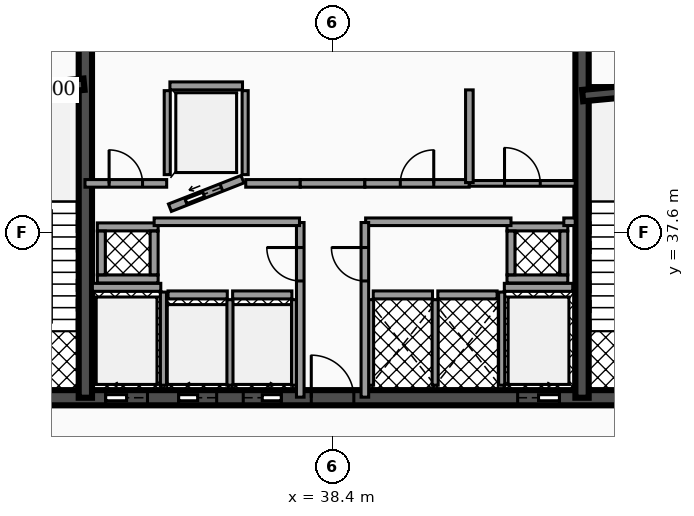
"""IFC4 building model, lengths in metres.
Left out: names, types, materials, properties, quantities, classifications, styles, units other than length and angle.
Written with IfcOpenShell. Run it as: python <this file> out.ifc"""

import sys

from ifc_helpers import new_model, si_unit, direction, frame, frame_2d, origin, place, context, subcontext, project, spatial, rectangle, extrude, element, fill, save


model = new_model("IFC4")
c1 = context("Model", 3, precision=1e-05, world=origin(), true_north=direction((0.0, 1.0)))
c2 = subcontext(c1, "Body", "Model", "MODEL_VIEW")
j1 = project(units=[si_unit("LENGTHUNIT", "METRE"), si_unit("PLANEANGLEUNIT", "RADIAN")], contexts=[c1])
p1 = place(None, origin())
s1 = spatial("IfcSite", under=j1, at=p1, CompositionType="ELEMENT")
p2 = place(p1, origin())
s2 = spatial("IfcBuilding", under=s1, at=p2, CompositionType="ELEMENT")
p3 = place(p2, frame((0.0, 0.0, 114.58)))
s3 = spatial("IfcBuildingStorey", under=s2, at=p3, CompositionType="ELEMENT", Elevation=114.58)
p4 = place(p3, frame((28.4, 33.25, 0.0), z_axis=(0.0, 0.0, 1.0), x_axis=(1.0, 0.0, 0.0)))
e1 = element("IfcWall", 1, at=p4, inside=s3, PredefinedType="SHEAR", context=c2, shape_type="SweptSolid", body=[
    extrude(rectangle(XDim=20.06, YDim=0.4, at=frame_2d((10.03, 0.0))), origin(), (0.0, 0.0, 1.0), 4.12),
])
p5 = place(p4, frame((4.03, 0.0, 0.0)))
e2 = element("IfcOpeningElement", 2, at=p5, cuts=e1, PredefinedType="OPENING", context=c2, shape_type="SweptSolid", body=[
    extrude(rectangle(XDim=1.1, YDim=2.15, at=frame_2d((0.55, 1.075))), frame((0.0, 0.21, 0.0), z_axis=(0.0, -1.0, 0.0), x_axis=(1.0, 0.0, 0.0)), (0.0, 0.0, 1.0), 0.42),
])
p6 = place(p4, frame((14.87, 0.0, 0.0)))
e3 = element("IfcOpeningElement", 3, at=p6, cuts=e1, PredefinedType="OPENING", context=c2, shape_type="SweptSolid", body=[
    extrude(rectangle(XDim=1.1, YDim=2.15, at=frame_2d((0.55, 1.075))), frame((0.0, 0.21, 0.0), z_axis=(0.0, -1.0, 0.0), x_axis=(1.0, 0.0, 0.0)), (0.0, 0.0, 1.0), 0.42),
])
p7 = place(p4, frame((5.95, 0.0, 0.0)))
e4 = element("IfcOpeningElement", 4, at=p7, cuts=e1, PredefinedType="OPENING", context=c2, shape_type="SweptSolid", body=[
    extrude(rectangle(XDim=1.0, YDim=2.1, at=frame_2d((0.5, 1.05))), frame((0.0, 0.21, 0.0), z_axis=(0.0, -1.0, 0.0), x_axis=(1.0, 0.0, 0.0)), (0.0, 0.0, 1.0), 0.42),
])
p8 = place(p4, frame((7.65, 0.0, 0.0)))
e5 = element("IfcOpeningElement", 5, at=p8, cuts=e1, PredefinedType="OPENING", context=c2, shape_type="SweptSolid", body=[
    extrude(rectangle(XDim=1.0, YDim=2.1, at=frame_2d((0.5, 1.05))), frame((0.0, 0.21, 0.0), z_axis=(0.0, -1.0, 0.0), x_axis=(1.0, 0.0, 0.0)), (0.0, 0.0, 1.0), 0.42),
])
p9 = place(p4, frame((1.31, 0.0, 0.0)))
e6 = element("IfcOpeningElement", 6, at=p9, cuts=e1, PredefinedType="OPENING", context=c2, shape_type="SweptSolid", body=[
    extrude(rectangle(XDim=1.1, YDim=2.2, at=frame_2d((0.55, 1.1))), frame((0.0, 0.21, 0.0), z_axis=(0.0, -1.0, 0.0), x_axis=(1.0, 0.0, 0.0)), (0.0, 0.0, 1.0), 0.42),
])
p10 = place(p4, frame((9.44, 0.0, 0.0)))
e7 = element("IfcOpeningElement", 7, at=p10, cuts=e1, PredefinedType="OPENING", context=c2, shape_type="SweptSolid", body=[
    extrude(rectangle(XDim=1.12, YDim=2.05, at=frame_2d((0.56, 1.025))), frame((0.0, 0.21, 0.0), z_axis=(0.0, -1.0, 0.0), x_axis=(1.0, 0.0, 0.0)), (0.0, 0.0, 1.0), 0.42),
])
p11 = place(p4, frame((17.65, 0.0, 0.0)))
e8 = element("IfcOpeningElement", 8, at=p11, cuts=e1, PredefinedType="OPENING", context=c2, shape_type="SweptSolid", body=[
    extrude(rectangle(XDim=1.1, YDim=2.2, at=frame_2d((0.55, 1.1))), frame((0.0, 0.21, 0.0), z_axis=(0.0, -1.0, 0.0), x_axis=(1.0, 0.0, 0.0)), (0.0, 0.0, 1.0), 0.42),
])
for number, where, z_axis, x_axis in (
    (9, (31.895, 33.25, 0.0), (0.0, 0.0, 1.0), (0.0, 1.0, 0.0)),
    (10, (44.965, 33.25, 0.0), (0.0, 0.0, 1.0), (0.0, 1.0, 0.0)),
):
    element("IfcWall", number, at=place(p3, frame(where, z_axis=z_axis, x_axis=x_axis)), inside=s3, PredefinedType="SHEAR", context=c2, shape_type="SweptSolid", body=[
        extrude(rectangle(XDim=10.2, YDim=0.35, at=frame_2d((5.1, 0.0))), origin(), (0.0, 0.0, 1.0), 4.12),
    ])
p12 = place(p3, frame((28.64, 41.2, 0.0), z_axis=(0.0, 0.0, 1.0), x_axis=(0.995687118776, 0.092774789157, 0.0)))
e11 = element("IfcWall", 11, at=p12, inside=s3, PredefinedType="SHEAR", context=c2, shape_type="SweptSolid", body=[
    extrude(rectangle(XDim=3.234, YDim=0.3, at=frame_2d((1.617, 0.0))), origin(), (0.0, 0.0, 1.0), 4.12),
])
p13 = place(p3, frame((44.98, 41.2, 0.0), z_axis=(0.0, 0.0, 1.0), x_axis=(0.995686468965, 0.09278176286, 0.0)))
e12 = element("IfcWall", 12, at=p13, inside=s3, PredefinedType="SHEAR", context=c2, shape_type="SweptSolid", body=[
    extrude(rectangle(XDim=3.234, YDim=0.3, at=frame_2d((1.617, 0.0))), origin(), (0.0, 0.0, 1.0), 4.12),
])
p14 = place(p3, frame((32.08, 36.155, 0.0), z_axis=(0.0, 0.0, 1.0), x_axis=(1.0, 0.0, 0.0)))
e13 = element("IfcWall", 13, at=p14, inside=s3, PredefinedType="SOLIDWALL", context=c2, shape_type="SweptSolid", body=[
    extrude(rectangle(XDim=1.8, YDim=0.21, at=frame_2d((0.9, 0.0))), origin(), (0.0, 0.0, 1.0), 3.092),
])
p15 = place(p3, frame((33.95, 33.58, 0.0), z_axis=(0.0, 0.0, 1.0), x_axis=(0.0, 1.0, 0.0)))
e14 = element("IfcWall", 14, at=p15, inside=s3, PredefinedType="SOLIDWALL", context=c2, shape_type="SweptSolid", body=[
    extrude(rectangle(XDim=2.45, YDim=0.16, at=frame_2d((1.225, 0.0))), origin(), (0.0, 0.0, 1.0), 3.092),
])
p16 = place(p3, frame((42.92, 36.155, 0.0), z_axis=(0.0, 0.0, 1.0), x_axis=(1.0, 0.0, 0.0)))
e15 = element("IfcWall", 15, at=p16, inside=s3, PredefinedType="SOLIDWALL", context=c2, shape_type="SweptSolid", body=[
    extrude(rectangle(XDim=1.8, YDim=0.21, at=frame_2d((0.9, 0.0))), origin(), (0.0, 0.0, 1.0), 3.092),
])
p17 = place(p3, frame((42.85, 33.58, 0.0), z_axis=(0.0, 0.0, 1.0), x_axis=(0.0, 1.0, 0.0)))
e16 = element("IfcWall", 16, at=p17, inside=s3, PredefinedType="SOLIDWALL", context=c2, shape_type="SweptSolid", body=[
    extrude(rectangle(XDim=2.45, YDim=0.16, at=frame_2d((1.225, 0.0))), origin(), (0.0, 0.0, 1.0), 3.092),
])
p18 = place(p3, frame((34.07, 35.955, 0.0), z_axis=(0.0, 0.0, 1.0), x_axis=(1.0, 0.0, 0.0)))
e17 = element("IfcWall", 17, at=p18, inside=s3, PredefinedType="SOLIDWALL", context=c2, shape_type="SweptSolid", body=[
    extrude(rectangle(XDim=1.56, YDim=0.21, at=frame_2d((0.78, 0.0))), origin(), (0.0, 0.0, 1.0), 3.092),
])
p19 = place(p3, frame((35.7, 33.58, 0.0), z_axis=(0.0, 0.0, 1.0), x_axis=(0.0, 1.0, 0.0)))
e18 = element("IfcWall", 18, at=p19, inside=s3, PredefinedType="SOLIDWALL", context=c2, shape_type="SweptSolid", body=[
    extrude(rectangle(XDim=2.25, YDim=0.16, at=frame_2d((1.125, 0.0))), origin(), (0.0, 0.0, 1.0), 3.092),
])
p20 = place(p3, frame((35.77, 35.955, 0.0), z_axis=(0.0, 0.0, 1.0), x_axis=(1.0, 0.0, 0.0)))
e19 = element("IfcWall", 19, at=p20, inside=s3, PredefinedType="SOLIDWALL", context=c2, shape_type="SweptSolid", body=[
    extrude(rectangle(XDim=1.56, YDim=0.21, at=frame_2d((0.78, 0.0))), origin(), (0.0, 0.0, 1.0), 3.092),
])
p21 = place(p3, frame((37.4, 33.58, 0.0), z_axis=(0.0, 0.0, 1.0), x_axis=(0.0, 1.0, 0.0)))
e20 = element("IfcWall", 20, at=p21, inside=s3, PredefinedType="SOLIDWALL", context=c2, shape_type="SweptSolid", body=[
    extrude(rectangle(XDim=2.25, YDim=0.16, at=frame_2d((1.125, 0.0))), origin(), (0.0, 0.0, 1.0), 3.092),
])
p22 = place(p3, frame((34.12, 38.25, 0.0), z_axis=(0.0, 0.0, 1.0), x_axis=(0.930804993012, 0.36551616241, 0.0)))
e21 = element("IfcWall", 21, at=p22, inside=s3, PredefinedType="SOLIDWALL", context=c2, shape_type="SweptSolid", body=[
    extrude(rectangle(XDim=2.052, YDim=0.21, at=frame_2d((1.026, 0.0))), origin(), (0.0, 0.0, 1.0), 3.092),
])
p23 = place(p22, frame((0.455, 0.0, 0.0)))
e22 = element("IfcOpeningElement", 22, at=p23, cuts=e21, PredefinedType="OPENING", context=c2, shape_type="SweptSolid", body=[
    extrude(rectangle(XDim=1.0, YDim=2.1, at=frame_2d((0.5, 1.05))), frame((0.0, 0.115, 0.0), z_axis=(0.0, -1.0, 0.0), x_axis=(1.0, 0.0, 0.0)), (0.0, 0.0, 1.0), 0.23),
])
p24 = place(p3, frame((34.12, 41.455, 0.0), z_axis=(0.0, 0.0, 1.0), x_axis=(1.0, 0.0, 0.0)))
e23 = element("IfcWall", 23, at=p24, inside=s3, PredefinedType="SOLIDWALL", context=c2, shape_type="SweptSolid", body=[
    extrude(rectangle(XDim=1.91, YDim=0.21, at=frame_2d((0.955, 0.0))), origin(), (0.0, 0.0, 1.0), 3.092),
])
for number, where, z_axis, x_axis in (
    (24, (34.05, 39.12, 0.0), (0.0, 0.0, 1.0), (0.0, 1.0, 0.0)),
    (25, (36.1, 39.12, 0.0), (0.0, 0.0, 1.0), (0.0, 1.0, 0.0)),
):
    element("IfcWall", number, at=place(p3, frame(where, z_axis=z_axis, x_axis=x_axis)), inside=s3, PredefinedType="SOLIDWALL", context=c2, shape_type="SweptSolid", body=[
        extrude(rectangle(XDim=2.21, YDim=0.16, at=frame_2d((1.105, 0.0))), origin(), (0.0, 0.0, 1.0), 3.092),
    ])
p25 = place(p3, frame((39.47, 35.955, 0.0), z_axis=(0.0, 0.0, 1.0), x_axis=(1.0, 0.0, 0.0)))
e26 = element("IfcWall", 26, at=p25, inside=s3, PredefinedType="SOLIDWALL", context=c2, shape_type="SweptSolid", body=[
    extrude(rectangle(XDim=1.56, YDim=0.21, at=frame_2d((0.78, 0.0))), origin(), (0.0, 0.0, 1.0), 3.092),
])
for number, where, z_axis, x_axis in (
    (27, (39.4, 33.58, 0.0), (0.0, 0.0, 1.0), (0.0, 1.0, 0.0)),
    (28, (41.1, 33.58, 0.0), (0.0, 0.0, 1.0), (0.0, 1.0, 0.0)),
):
    element("IfcWall", number, at=place(p3, frame(where, z_axis=z_axis, x_axis=x_axis)), inside=s3, PredefinedType="SOLIDWALL", context=c2, shape_type="SweptSolid", body=[
        extrude(rectangle(XDim=2.25, YDim=0.16, at=frame_2d((1.125, 0.0))), origin(), (0.0, 0.0, 1.0), 3.092),
    ])
p26 = place(p3, frame((41.17, 35.955, 0.0), z_axis=(0.0, 0.0, 1.0), x_axis=(1.0, 0.0, 0.0)))
e29 = element("IfcWall", 29, at=p26, inside=s3, PredefinedType="SOLIDWALL", context=c2, shape_type="SweptSolid", body=[
    extrude(rectangle(XDim=1.56, YDim=0.21, at=frame_2d((0.78, 0.0))), origin(), (0.0, 0.0, 1.0), 3.092),
])
for number, where, z_axis, x_axis in (
    (30, (32.21, 36.375, 0.0), (0.0, 0.0, 1.0), (1.0, 0.0, 0.0)),
    (31, (32.21, 37.745, 0.0), (0.0, 0.0, 1.0), (1.0, 0.0, 0.0)),
):
    element("IfcWall", number, at=place(p3, frame(where, z_axis=z_axis, x_axis=x_axis)), inside=s3, PredefinedType="SOLIDWALL", context=c2, shape_type="SweptSolid", body=[
        extrude(rectangle(XDim=1.6, YDim=0.21, at=frame_2d((0.8, 0.0))), origin(), (0.0, 0.0, 1.0), 4.12),
    ])
for number, where, z_axis, x_axis in (
    (32, (32.315, 36.485, 0.0), (0.0, 0.0, 1.0), (0.0, 1.0, 0.0)),
    (33, (33.705, 36.485, 0.0), (0.0, 0.0, 1.0), (0.0, 1.0, 0.0)),
):
    element("IfcWall", number, at=place(p3, frame(where, z_axis=z_axis, x_axis=x_axis)), inside=s3, PredefinedType="SOLIDWALL", context=c2, shape_type="SweptSolid", body=[
        extrude(rectangle(XDim=1.15, YDim=0.21, at=frame_2d((0.575, 0.0))), origin(), (0.0, 0.0, 1.0), 4.12),
    ])
for number, where, z_axis, x_axis in (
    (34, (42.99, 36.375, 0.0), (0.0, 0.0, 1.0), (1.0, 0.0, 0.0)),
    (35, (42.99, 37.745, 0.0), (0.0, 0.0, 1.0), (1.0, 0.0, 0.0)),
):
    element("IfcWall", number, at=place(p3, frame(where, z_axis=z_axis, x_axis=x_axis)), inside=s3, PredefinedType="SOLIDWALL", context=c2, shape_type="SweptSolid", body=[
        extrude(rectangle(XDim=1.6, YDim=0.21, at=frame_2d((0.8, 0.0))), origin(), (0.0, 0.0, 1.0), 4.12),
    ])
for number, where, z_axis, x_axis in (
    (36, (43.095, 36.485, 0.0), (0.0, 0.0, 1.0), (0.0, 1.0, 0.0)),
    (37, (44.485, 36.485, 0.0), (0.0, 0.0, 1.0), (0.0, 1.0, 0.0)),
):
    element("IfcWall", number, at=place(p3, frame(where, z_axis=z_axis, x_axis=x_axis)), inside=s3, PredefinedType="SOLIDWALL", context=c2, shape_type="SweptSolid", body=[
        extrude(rectangle(XDim=1.15, YDim=0.21, at=frame_2d((0.575, 0.0))), origin(), (0.0, 0.0, 1.0), 4.12),
    ])
p27 = place(p3, frame((37.55, 33.265, 0.0), z_axis=(0.0, 0.0, 1.0), x_axis=(0.0, 1.0, 0.0)))
e38 = element("IfcWall", 38, at=p27, inside=s3, PredefinedType="PARTITIONING", context=c2, shape_type="SweptSolid", body=[
    extrude(rectangle(XDim=4.595, YDim=0.2, at=frame_2d((2.298, 0.0))), origin(), (0.0, 0.0, 1.0), 3.077),
])
p28 = place(p27, frame((3.058, 0.0, 0.0)))
e39 = element("IfcOpeningElement", 39, at=p28, cuts=e38, PredefinedType="OPENING", context=c2, shape_type="SweptSolid", body=[
    extrude(rectangle(XDim=0.88, YDim=2.05, at=frame_2d((0.44, 1.025))), frame((0.0, 0.11, 0.0), z_axis=(0.0, -1.0, 0.0), x_axis=(1.0, 0.0, 0.0)), (0.0, 0.0, 1.0), 0.22),
])
p29 = place(p3, frame((33.705, 37.88, 0.0), z_axis=(0.0, 0.0, 1.0), x_axis=(1.0, 0.0, 0.0)))
e40 = element("IfcWall", 40, at=p29, inside=s3, PredefinedType="PARTITIONING", context=c2, shape_type="SweptSolid", body=[
    extrude(rectangle(XDim=3.825, YDim=0.2, at=frame_2d((1.913, 0.0))), origin(), (0.0, 0.0, 1.0), 3.077),
])
p30 = place(p3, frame((31.885, 38.89, 0.0), z_axis=(0.0, 0.0, 1.0), x_axis=(1.0, 0.0, 0.0)))
e41 = element("IfcWall", 41, at=p30, inside=s3, PredefinedType="PARTITIONING", context=c2, shape_type="SweptSolid", body=[
    extrude(rectangle(XDim=2.15, YDim=0.2, at=frame_2d((1.075, 0.0))), origin(), (0.0, 0.0, 1.0), 3.077),
])
p31 = place(p30, frame((0.635, 0.0, 0.0)))
e42 = element("IfcOpeningElement", 42, at=p31, cuts=e41, PredefinedType="OPENING", context=c2, shape_type="SweptSolid", body=[
    extrude(rectangle(XDim=0.88, YDim=2.05, at=frame_2d((0.44, 1.025))), frame((0.0, 0.11, 0.0), z_axis=(0.0, -1.0, 0.0), x_axis=(1.0, 0.0, 0.0)), (0.0, 0.0, 1.0), 0.22),
])
p32 = place(p3, frame((36.115, 38.89, 0.0), z_axis=(0.0, 0.0, 1.0), x_axis=(1.0, 0.0, 0.0)))
e43 = element("IfcWall", 43, at=p32, inside=s3, PredefinedType="PARTITIONING", context=c2, shape_type="SweptSolid", body=[
    extrude(rectangle(XDim=1.435, YDim=0.2, at=frame_2d((0.718, 0.0))), origin(), (0.0, 0.0, 1.0), 3.077),
])
p33 = place(p3, frame((37.55, 38.89, 0.0), z_axis=(0.0, 0.0, 1.0), x_axis=(1.0, 0.0, 0.0)))
e44 = element("IfcWall", 44, at=p33, inside=s3, PredefinedType="PARTITIONING", context=c2, shape_type="SweptSolid", body=[
    extrude(rectangle(XDim=1.7, YDim=0.2, at=frame_2d((0.85, 0.0))), origin(), (0.0, 0.0, 1.0), 3.077),
])
p34 = place(p3, frame((39.25, 38.89, 0.0), z_axis=(0.0, 0.0, 1.0), x_axis=(1.0, 0.0, 0.0)))
e45 = element("IfcWall", 45, at=p34, inside=s3, PredefinedType="PARTITIONING", context=c2, shape_type="SweptSolid", body=[
    extrude(rectangle(XDim=2.745, YDim=0.2, at=frame_2d((1.373, 0.0))), origin(), (0.0, 0.0, 1.0), 3.077),
])
p35 = place(p34, frame((0.933, 0.0, 0.0)))
e46 = element("IfcOpeningElement", 46, at=p35, cuts=e45, PredefinedType="OPENING", context=c2, shape_type="SweptSolid", body=[
    extrude(rectangle(XDim=0.88, YDim=2.05, at=frame_2d((0.44, 1.025))), frame((0.0, 0.11, 0.0), z_axis=(0.0, -1.0, 0.0), x_axis=(1.0, 0.0, 0.0)), (0.0, 0.0, 1.0), 0.22),
])
p36 = place(p3, frame((42.005, 38.89, 0.0), z_axis=(0.0, 0.0, 1.0), x_axis=(1.0, 0.0, 0.0)))
e47 = element("IfcWall", 47, at=p36, inside=s3, PredefinedType="PARTITIONING", context=c2, shape_type="SweptSolid", body=[
    extrude(rectangle(XDim=2.78, YDim=0.15, at=frame_2d((1.39, 0.0))), origin(), (0.0, 0.0, 1.0), 3.077),
])
p37 = place(p36, frame((0.92, 0.0, 0.0)))
e48 = element("IfcOpeningElement", 48, at=p37, cuts=e47, PredefinedType="OPENING", context=c2, shape_type="SweptSolid", body=[
    extrude(rectangle(XDim=0.94, YDim=2.05, at=frame_2d((0.47, 1.025))), frame((0.0, 0.085, 0.0), z_axis=(0.0, -1.0, 0.0), x_axis=(1.0, 0.0, 0.0)), (0.0, 0.0, 1.0), 0.17),
])
p38 = place(p3, frame((39.27, 37.88, 0.0), z_axis=(0.0, 0.0, 1.0), x_axis=(1.0, 0.0, 0.0)))
e49 = element("IfcWall", 49, at=p38, inside=s3, PredefinedType="PARTITIONING", context=c2, shape_type="SweptSolid", body=[
    extrude(rectangle(XDim=3.825, YDim=0.2, at=frame_2d((1.913, 0.0))), origin(), (0.0, 0.0, 1.0), 3.077),
])
p39 = place(p3, frame((44.485, 37.88, 0.0), z_axis=(0.0, 0.0, 1.0), x_axis=(1.0, 0.0, 0.0)))
e50 = element("IfcWall", 50, at=p39, inside=s3, PredefinedType="PARTITIONING", context=c2, shape_type="SweptSolid", body=[
    extrude(rectangle(XDim=0.3, YDim=0.2, at=frame_2d((0.15, 0.0))), origin(), (0.0, 0.0, 1.0), 3.077),
])
p40 = place(p3, frame((39.25, 33.265, 0.0), z_axis=(0.0, 0.0, 1.0), x_axis=(0.0, 1.0, 0.0)))
e51 = element("IfcWall", 51, at=p40, inside=s3, PredefinedType="PARTITIONING", context=c2, shape_type="SweptSolid", body=[
    extrude(rectangle(XDim=4.595, YDim=0.2, at=frame_2d((2.298, 0.0))), origin(), (0.0, 0.0, 1.0), 3.077),
])
p41 = place(p40, frame((3.058, 0.0, 0.0)))
e52 = element("IfcOpeningElement", 52, at=p41, cuts=e51, PredefinedType="OPENING", context=c2, shape_type="SweptSolid", body=[
    extrude(rectangle(XDim=0.88, YDim=2.05, at=frame_2d((0.44, 1.025))), frame((0.0, 0.11, 0.0), z_axis=(0.0, -1.0, 0.0), x_axis=(1.0, 0.0, 0.0)), (0.0, 0.0, 1.0), 0.22),
])
p42 = place(p3, frame((42.0, 38.91, 0.0), z_axis=(0.0, 0.0, 1.0), x_axis=(0.0, 1.0, 0.0)))
e53 = element("IfcWall", 53, at=p42, inside=s3, PredefinedType="PARTITIONING", context=c2, shape_type="SweptSolid", body=[
    extrude(rectangle(XDim=2.44, YDim=0.2, at=frame_2d((1.22, 0.0))), origin(), (0.0, 0.0, 1.0), 3.077),
])
p43 = place(p5, origin())
e54 = element("IfcDoor", 54, at=p43, inside=s3, OperationType="SLIDING_TO_LEFT", PredefinedType="DOOR", context=c2, shape_type="SweptSolid", body=[
    extrude(rectangle(XDim=1.1, YDim=2.15, at=frame_2d((0.55, 1.075))), frame((0.0, 0.025, 0.0), z_axis=(0.0, -1.0, 0.0), x_axis=(1.0, 0.0, 0.0)), (0.0, 0.0, 1.0), 0.05),
])
fill(e2, e54)
p44 = place(p6, origin())
e55 = element("IfcDoor", 55, at=p44, inside=s3, OperationType="SLIDING_TO_RIGHT", PredefinedType="DOOR", context=c2, shape_type="SweptSolid", body=[
    extrude(rectangle(XDim=1.1, YDim=2.15, at=frame_2d((0.55, 1.075))), frame((0.0, 0.025, 0.0), z_axis=(0.0, -1.0, 0.0), x_axis=(1.0, 0.0, 0.0)), (0.0, 0.0, 1.0), 0.05),
])
fill(e3, e55)
p45 = place(p7, origin())
e56 = element("IfcDoor", 56, at=p45, inside=s3, OperationType="SLIDING_TO_LEFT", PredefinedType="DOOR", context=c2, shape_type="SweptSolid", body=[
    extrude(rectangle(XDim=1.0, YDim=2.1, at=frame_2d((0.5, 1.05))), frame((0.0, 0.025, 0.0), z_axis=(0.0, -1.0, 0.0), x_axis=(1.0, 0.0, 0.0)), (0.0, 0.0, 1.0), 0.05),
])
fill(e4, e56)
p46 = place(p8, origin())
e57 = element("IfcDoor", 57, at=p46, inside=s3, OperationType="SLIDING_TO_RIGHT", PredefinedType="DOOR", context=c2, shape_type="SweptSolid", body=[
    extrude(rectangle(XDim=1.0, YDim=2.1, at=frame_2d((0.5, 1.05))), frame((0.0, 0.025, 0.0), z_axis=(0.0, -1.0, 0.0), x_axis=(1.0, 0.0, 0.0)), (0.0, 0.0, 1.0), 0.05),
])
fill(e5, e57)
p47 = place(p23, origin())
e58 = element("IfcDoor", 58, at=p47, inside=s3, OperationType="SLIDING_TO_LEFT", PredefinedType="DOOR", context=c2, shape_type="SweptSolid", body=[
    extrude(rectangle(XDim=1.0, YDim=2.1, at=frame_2d((0.5, 1.05))), frame((0.0, 0.025, 0.0), z_axis=(0.0, -1.0, 0.0), x_axis=(1.0, 0.0, 0.0)), (0.0, 0.0, 1.0), 0.05),
])
fill(e22, e58)
p48 = place(p10, origin())
e59 = element("IfcDoor", 59, at=p48, inside=s3, OperationType="SINGLE_SWING_LEFT", PredefinedType="DOOR", context=c2, shape_type="SweptSolid", body=[
    extrude(rectangle(XDim=1.12, YDim=2.05, at=frame_2d((0.56, 1.025))), frame((0.0, 0.025, 0.0), z_axis=(0.0, -1.0, 0.0), x_axis=(1.0, 0.0, 0.0)), (0.0, 0.0, 1.0), 0.05),
])
fill(e7, e59)
p49 = place(p28, origin())
e60 = element("IfcDoor", 60, at=p49, inside=s3, OperationType="SINGLE_SWING_RIGHT", PredefinedType="DOOR", context=c2, shape_type="SweptSolid", body=[
    extrude(rectangle(XDim=0.88, YDim=2.05, at=frame_2d((0.44, 1.025))), frame((0.0, 0.025, 0.0), z_axis=(0.0, -1.0, 0.0), x_axis=(1.0, 0.0, 0.0)), (0.0, 0.0, 1.0), 0.05),
])
fill(e39, e60)
p50 = place(p31, origin())
e61 = element("IfcDoor", 61, at=p50, inside=s3, OperationType="SINGLE_SWING_LEFT", PredefinedType="DOOR", context=c2, shape_type="SweptSolid", body=[
    extrude(rectangle(XDim=0.88, YDim=2.05, at=frame_2d((0.44, 1.025))), frame((0.0, 0.025, 0.0), z_axis=(0.0, -1.0, 0.0), x_axis=(1.0, 0.0, 0.0)), (0.0, 0.0, 1.0), 0.05),
])
fill(e42, e61)
p51 = place(p35, origin())
e62 = element("IfcDoor", 62, at=p51, inside=s3, OperationType="SINGLE_SWING_RIGHT", PredefinedType="DOOR", context=c2, shape_type="SweptSolid", body=[
    extrude(rectangle(XDim=0.88, YDim=2.05, at=frame_2d((0.44, 1.025))), frame((0.0, 0.025, 0.0), z_axis=(0.0, -1.0, 0.0), x_axis=(1.0, 0.0, 0.0)), (0.0, 0.0, 1.0), 0.05),
])
fill(e46, e62)
p52 = place(p37, origin())
e63 = element("IfcDoor", 63, at=p52, inside=s3, OperationType="SINGLE_SWING_LEFT", PredefinedType="DOOR", context=c2, shape_type="SweptSolid", body=[
    extrude(rectangle(XDim=0.94, YDim=2.05, at=frame_2d((0.47, 1.025))), frame((0.0, 0.025, 0.0), z_axis=(0.0, -1.0, 0.0), x_axis=(1.0, 0.0, 0.0)), (0.0, 0.0, 1.0), 0.05),
])
fill(e48, e63)
p53 = place(p41, origin())
e64 = element("IfcDoor", 64, at=p53, inside=s3, OperationType="SINGLE_SWING_RIGHT", PredefinedType="DOOR", context=c2, shape_type="SweptSolid", body=[
    extrude(rectangle(XDim=0.88, YDim=2.05, at=frame_2d((0.44, 1.025))), frame((0.0, 0.025, 0.0), z_axis=(0.0, -1.0, 0.0), x_axis=(1.0, 0.0, 0.0)), (0.0, 0.0, 1.0), 0.05),
])
fill(e52, e64)
save(model, sys.argv[1])
